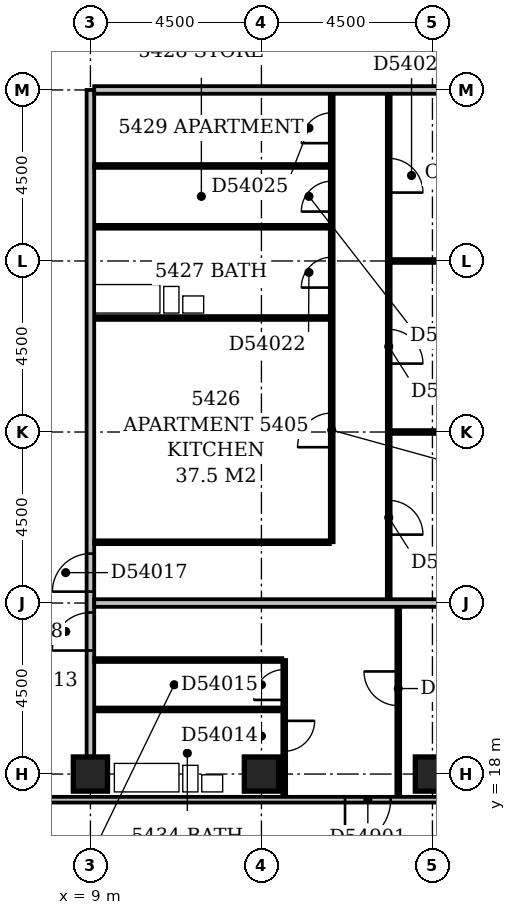
"""IFC4 building model, lengths in metres.
Left out: names, types, materials, properties, quantities, classifications, styles, units other than length and angle.
Written with IfcOpenShell. Run it as: python <this file> out.ifc"""

import sys

from ifc_helpers import new_model, si_unit, direction, frame, frame_2d, origin, origin_2d, place, context, subcontext, project, spatial, rectangle, extrude, element, fill, save


model = new_model("IFC4")
c1 = context("Model", 3, precision=1e-05, world=origin(), true_north=direction((0.0, 1.0)))
c2 = subcontext(c1, "Body", "Model", "MODEL_VIEW")
j1 = project(units=[si_unit("LENGTHUNIT", "METRE"), si_unit("PLANEANGLEUNIT", "RADIAN")], contexts=[c1])
p1 = place(None, origin())
s1 = spatial("IfcSite", under=j1, at=p1, CompositionType="ELEMENT")
p2 = place(p1, origin())
s2 = spatial("IfcBuilding", under=s1, at=p2, CompositionType="ELEMENT")
p3 = place(p2, frame((0.0, 0.0, 211.4)))
s3 = spatial("IfcBuildingStorey", under=s2, at=p3, CompositionType="ELEMENT", Elevation=211.4)
for number, where, z_axis, x_axis in (
    (1, (9.0, 18.0, -0.35), (0.0, 0.0, 1.0), (1.0, 0.0, 0.0)),
    (2, (13.5, 18.0, -0.35), (0.0, 0.0, 1.0), (1.0, 0.0, 0.0)),
    (3, (18.0, 18.0, -0.35), (0.0, 0.0, 1.0), (1.0, 0.0, 0.0)),
):
    element("IfcColumn", number, at=place(p3, frame(where, z_axis=z_axis, x_axis=x_axis)), inside=s3, PredefinedType="COLUMN", context=c2, shape_type="SweptSolid", body=[
        extrude(rectangle(XDim=0.9, YDim=0.9, at=origin_2d()), origin(), (0.0, 0.0, 1.0), 3.65),
    ])
p4 = place(p3, frame((3.9, 17.325, 0.0), z_axis=(0.0, 0.0, 1.0), x_axis=(1.0, 0.0, 0.0)))
e4 = element("IfcWall", 4, at=p4, inside=s3, PredefinedType="STANDARD", context=c2, shape_type="SweptSolid", body=[
    extrude(rectangle(XDim=19.35, YDim=0.15, at=frame_2d((9.675, 0.0))), origin(), (0.0, 0.0, 1.0), 2.7),
])
p5 = place(p4, frame((11.8, 0.0, 0.0)))
e5 = element("IfcOpeningElement", 5, at=p5, cuts=e4, PredefinedType="OPENING", context=c2, shape_type="SweptSolid", body=[
    extrude(rectangle(XDim=1.2, YDim=2.4, at=frame_2d((0.6, 1.2))), frame((0.0, 0.087, 0.0), z_axis=(0.0, -1.0, 0.0), x_axis=(1.0, 0.0, 0.0)), (0.0, 0.0, 1.0), 0.174),
])
p6 = place(p4, frame((15.15, 0.0, 0.6)))
e6 = element("IfcOpeningElement", 6, at=p6, cuts=e4, PredefinedType="OPENING", context=c2, shape_type="SweptSolid", body=[
    extrude(rectangle(XDim=2.4, YDim=1.8, at=frame_2d((1.2, 0.9))), frame((0.0, 0.087, 0.0), z_axis=(0.0, -1.0, 0.0), x_axis=(1.0, 0.0, 0.0)), (0.0, 0.0, 1.0), 0.174),
])
p7 = place(p3, frame((14.1, 17.4, 0.0), z_axis=(0.0, 0.0, 1.0), x_axis=(0.0, 1.0, 0.0)))
e7 = element("IfcWall", 7, at=p7, inside=s3, PredefinedType="PARTITIONING", context=c2, shape_type="SweptSolid", body=[
    extrude(rectangle(XDim=3.6, YDim=0.1, at=frame_2d((1.8, 0.0))), origin(), (0.0, 0.0, 1.0), 3.3),
])
p8 = place(p7, frame((1.2, 0.0, 0.0)))
e8 = element("IfcOpeningElement", 8, at=p8, cuts=e7, PredefinedType="OPENING", context=c2, shape_type="SweptSolid", body=[
    extrude(rectangle(XDim=0.8, YDim=2.1, at=frame_2d((0.4, 1.05))), frame((0.0, 0.062, 0.0), z_axis=(0.0, -1.0, 0.0), x_axis=(1.0, 0.0, 0.0)), (0.0, 0.0, 1.0), 0.124),
])
p9 = place(p7, frame((2.55, 0.0, 0.0)))
e9 = element("IfcOpeningElement", 9, at=p9, cuts=e7, PredefinedType="OPENING", context=c2, shape_type="SweptSolid", body=[
    extrude(rectangle(XDim=0.8, YDim=2.1, at=frame_2d((0.4, 1.05))), frame((0.0, 0.062, 0.0), z_axis=(0.0, -1.0, 0.0), x_axis=(1.0, 0.0, 0.0)), (0.0, 0.0, 1.0), 0.124),
])
p10 = place(p3, frame((17.1, 17.4, 0.0), z_axis=(0.0, 0.0, 1.0), x_axis=(0.0, 1.0, 0.0)))
e10 = element("IfcWall", 10, at=p10, inside=s3, PredefinedType="PARTITIONING", context=c2, shape_type="SweptSolid", body=[
    extrude(rectangle(XDim=5.0, YDim=0.1, at=frame_2d((2.5, 0.0))), origin(), (0.0, 0.0, 1.0), 3.3),
])
p11 = place(p10, frame((2.4, 0.0, 0.0)))
e11 = element("IfcOpeningElement", 11, at=p11, cuts=e10, PredefinedType="OPENING", context=c2, shape_type="SweptSolid", body=[
    extrude(rectangle(XDim=0.9, YDim=2.1, at=frame_2d((0.45, 1.05))), frame((0.0, 0.062, 0.0), z_axis=(0.0, -1.0, 0.0), x_axis=(1.0, 0.0, 0.0)), (0.0, 0.0, 1.0), 0.124),
])
p12 = place(p3, frame((9.0, 18.45, 0.0), z_axis=(0.0, 0.0, 1.0), x_axis=(0.0, 1.0, 0.0)))
e12 = element("IfcWall", 12, at=p12, inside=s3, PredefinedType="PARTITIONING", context=c2, shape_type="SweptSolid", body=[
    extrude(rectangle(XDim=17.55, YDim=0.2, at=frame_2d((8.775, 0.0))), origin(), (0.0, 0.0, 1.0), 3.3),
])
p13 = place(p12, frame((4.35, 0.0, 0.0)))
e13 = element("IfcOpeningElement", 13, at=p13, cuts=e12, PredefinedType="OPENING", context=c2, shape_type="SweptSolid", body=[
    extrude(rectangle(XDim=1.0, YDim=2.1, at=frame_2d((0.5, 1.05))), frame((0.0, 0.112, 0.0), z_axis=(0.0, -1.0, 0.0), x_axis=(1.0, 0.0, 0.0)), (0.0, 0.0, 1.0), 0.224),
])
p14 = place(p12, frame((2.8, 0.0, 0.0)))
e14 = element("IfcOpeningElement", 14, at=p14, cuts=e12, PredefinedType="OPENING", context=c2, shape_type="SweptSolid", body=[
    extrude(rectangle(XDim=1.0, YDim=2.1, at=frame_2d((0.5, 1.05))), frame((0.0, 0.112, 0.0), z_axis=(0.0, -1.0, 0.0), x_axis=(1.0, 0.0, 0.0)), (0.0, 0.0, 1.0), 0.224),
])
p15 = place(p3, frame((9.1, 19.7, 0.0), z_axis=(0.0, 0.0, 1.0), x_axis=(1.0, 0.0, 0.0)))
e15 = element("IfcWall", 15, at=p15, inside=s3, PredefinedType="PLUMBINGWALL", context=c2, shape_type="SweptSolid", body=[
    extrude(rectangle(XDim=4.95, YDim=0.1, at=frame_2d((2.475, 0.0))), origin(), (0.0, 0.0, 1.0), 3.3),
])
p16 = place(p3, frame((9.1, 21.0, 0.0), z_axis=(0.0, 0.0, 1.0), x_axis=(1.0, 0.0, 0.0)))
e16 = element("IfcWall", 16, at=p16, inside=s3, PredefinedType="PARTITIONING", context=c2, shape_type="SweptSolid", body=[
    extrude(rectangle(XDim=4.95, YDim=0.1, at=frame_2d((2.475, 0.0))), origin(), (0.0, 0.0, 1.0), 3.3),
])
p17 = place(p3, frame((9.1, 22.5, 0.0), z_axis=(0.0, 0.0, 1.0), x_axis=(1.0, 0.0, 0.0)))
e17 = element("IfcWall", 17, at=p17, inside=s3, PredefinedType="PARTITIONING", context=c2, shape_type="SweptSolid", body=[
    extrude(rectangle(XDim=12.95, YDim=0.2, at=frame_2d((6.475, 0.0))), origin(), (0.0, 0.0, 1.0), 3.3),
])
p18 = place(p3, frame((16.85, 22.6, 0.0), z_axis=(0.0, 0.0, 1.0), x_axis=(0.0, 1.0, 0.0)))
e18 = element("IfcWall", 18, at=p18, inside=s3, PredefinedType="PARTITIONING", context=c2, shape_type="SweptSolid", body=[
    extrude(rectangle(XDim=13.3, YDim=0.1, at=frame_2d((6.65, 0.0))), origin(), (0.0, 0.0, 1.0), 3.3),
])
p19 = place(p18, frame((1.7, 0.0, 0.0)))
e19 = element("IfcOpeningElement", 19, at=p19, cuts=e18, PredefinedType="OPENING", context=c2, shape_type="SweptSolid", body=[
    extrude(rectangle(XDim=0.9, YDim=2.1, at=frame_2d((0.45, 1.05))), frame((0.0, 0.062, 0.0), z_axis=(0.0, -1.0, 0.0), x_axis=(1.0, 0.0, 0.0)), (0.0, 0.0, 1.0), 0.124),
])
p20 = place(p18, frame((6.2, 0.0, 0.0)))
e20 = element("IfcOpeningElement", 20, at=p20, cuts=e18, PredefinedType="OPENING", context=c2, shape_type="SweptSolid", body=[
    extrude(rectangle(XDim=0.9, YDim=2.1, at=frame_2d((0.45, 1.05))), frame((0.0, 0.062, 0.0), z_axis=(0.0, -1.0, 0.0), x_axis=(1.0, 0.0, 0.0)), (0.0, 0.0, 1.0), 0.124),
])
p21 = place(p18, frame((10.7, 0.0, 0.0)))
e21 = element("IfcOpeningElement", 21, at=p21, cuts=e18, PredefinedType="OPENING", context=c2, shape_type="SweptSolid", body=[
    extrude(rectangle(XDim=0.9, YDim=2.1, at=frame_2d((0.45, 1.05))), frame((0.0, 0.062, 0.0), z_axis=(0.0, -1.0, 0.0), x_axis=(1.0, 0.0, 0.0)), (0.0, 0.0, 1.0), 0.124),
])
p22 = place(p3, frame((9.1, 24.1, 0.0), z_axis=(0.0, 0.0, 1.0), x_axis=(1.0, 0.0, 0.0)))
e22 = element("IfcWall", 22, at=p22, inside=s3, PredefinedType="PARTITIONING", context=c2, shape_type="SweptSolid", body=[
    extrude(rectangle(XDim=6.2, YDim=0.1, at=frame_2d((3.1, 0.0))), origin(), (0.0, 0.0, 1.0), 3.3),
])
p23 = place(p3, frame((15.35, 24.1, 0.0), z_axis=(0.0, 0.0, 1.0), x_axis=(0.0, 1.0, 0.0)))
e23 = element("IfcWall", 23, at=p23, inside=s3, PredefinedType="PARTITIONING", context=c2, shape_type="SweptSolid", body=[
    extrude(rectangle(XDim=11.8, YDim=0.1, at=frame_2d((5.9, 0.0))), origin(), (0.0, 0.0, 1.0), 3.3),
])
p24 = place(p23, frame((6.7, 0.0, 0.0)))
e24 = element("IfcOpeningElement", 24, at=p24, cuts=e23, PredefinedType="OPENING", context=c2, shape_type="SweptSolid", body=[
    extrude(rectangle(XDim=0.8, YDim=2.1, at=frame_2d((0.4, 1.05))), frame((0.0, 0.062, 0.0), z_axis=(0.0, -1.0, 0.0), x_axis=(1.0, 0.0, 0.0)), (0.0, 0.0, 1.0), 0.124),
])
p25 = place(p23, frame((2.5, 0.0, 0.0)))
e25 = element("IfcOpeningElement", 25, at=p25, cuts=e23, PredefinedType="OPENING", context=c2, shape_type="SweptSolid", body=[
    extrude(rectangle(XDim=0.9, YDim=2.1, at=frame_2d((0.45, 1.05))), frame((0.0, 0.062, 0.0), z_axis=(0.0, -1.0, 0.0), x_axis=(1.0, 0.0, 0.0)), (0.0, 0.0, 1.0), 0.124),
])
p26 = place(p23, frame((8.7, 0.0, 0.0)))
e26 = element("IfcOpeningElement", 26, at=p26, cuts=e23, PredefinedType="OPENING", context=c2, shape_type="SweptSolid", body=[
    extrude(rectangle(XDim=0.8, YDim=2.1, at=frame_2d((0.4, 1.05))), frame((0.0, 0.062, 0.0), z_axis=(0.0, -1.0, 0.0), x_axis=(1.0, 0.0, 0.0)), (0.0, 0.0, 1.0), 0.124),
])
p27 = place(p23, frame((10.5, 0.0, 0.0)))
e27 = element("IfcOpeningElement", 27, at=p27, cuts=e23, PredefinedType="OPENING", context=c2, shape_type="SweptSolid", body=[
    extrude(rectangle(XDim=0.8, YDim=2.1, at=frame_2d((0.4, 1.05))), frame((0.0, 0.062, 0.0), z_axis=(0.0, -1.0, 0.0), x_axis=(1.0, 0.0, 0.0)), (0.0, 0.0, 1.0), 0.124),
])
p28 = place(p3, frame((16.9, 27.0, 0.0), z_axis=(0.0, 0.0, 1.0), x_axis=(1.0, 0.0, 0.0)))
e28 = element("IfcWall", 28, at=p28, inside=s3, PredefinedType="PARTITIONING", context=c2, shape_type="SweptSolid", body=[
    extrude(rectangle(XDim=5.15, YDim=0.1, at=frame_2d((2.575, 0.0))), origin(), (0.0, 0.0, 1.0), 2.7),
])
p29 = place(p3, frame((9.1, 30.0, 0.0), z_axis=(0.0, 0.0, 1.0), x_axis=(1.0, 0.0, 0.0)))
e29 = element("IfcWall", 29, at=p29, inside=s3, PredefinedType="PLUMBINGWALL", context=c2, shape_type="SweptSolid", body=[
    extrude(rectangle(XDim=6.2, YDim=0.1, at=frame_2d((3.1, 0.0))), origin(), (0.0, 0.0, 1.0), 3.3),
])
p30 = place(p3, frame((16.9, 31.5, 0.0), z_axis=(0.0, 0.0, 1.0), x_axis=(1.0, 0.0, 0.0)))
e30 = element("IfcWall", 30, at=p30, inside=s3, PredefinedType="PARTITIONING", context=c2, shape_type="SweptSolid", body=[
    extrude(rectangle(XDim=5.15, YDim=0.1, at=frame_2d((2.575, 0.0))), origin(), (0.0, 0.0, 1.0), 3.3),
])
p31 = place(p3, frame((9.1, 32.4, 0.0), z_axis=(0.0, 0.0, 1.0), x_axis=(1.0, 0.0, 0.0)))
e31 = element("IfcWall", 31, at=p31, inside=s3, PredefinedType="PLUMBINGWALL", context=c2, shape_type="SweptSolid", body=[
    extrude(rectangle(XDim=6.2, YDim=0.1, at=frame_2d((3.1, 0.0))), origin(), (0.0, 0.0, 1.0), 3.3),
])
p32 = place(p3, frame((9.1, 34.0, 0.0), z_axis=(0.0, 0.0, 1.0), x_axis=(1.0, 0.0, 0.0)))
e32 = element("IfcWall", 32, at=p32, inside=s3, PredefinedType="PARTITIONING", context=c2, shape_type="SweptSolid", body=[
    extrude(rectangle(XDim=6.2, YDim=0.1, at=frame_2d((3.1, 0.0))), origin(), (0.0, 0.0, 1.0), 3.3),
])
p33 = place(p3, frame((9.1, 36.0, 0.0), z_axis=(0.0, 0.0, 1.0), x_axis=(1.0, 0.0, 0.0)))
e33 = element("IfcWall", 33, at=p33, inside=s3, PredefinedType="PARTITIONING", context=c2, shape_type="SweptSolid", body=[
    extrude(rectangle(XDim=12.95, YDim=0.2, at=frame_2d((6.475, 0.0))), origin(), (0.0, 0.0, 1.0), 3.3),
])
p34 = place(p5, origin())
e34 = element("IfcDoor", 34, at=p34, inside=s3, OperationType="DOUBLE_DOOR_SINGLE_SWING", PredefinedType="DOOR", context=c2, shape_type="SweptSolid", body=[
    extrude(rectangle(XDim=1.2, YDim=2.4, at=frame_2d((0.6, 1.2))), frame((0.0, 0.025, 0.0), z_axis=(0.0, -1.0, 0.0), x_axis=(1.0, 0.0, 0.0)), (0.0, 0.0, 1.0), 0.05),
])
fill(e5, e34)
p35 = place(p8, origin())
e35 = element("IfcDoor", 35, at=p35, inside=s3, OperationType="SINGLE_SWING_RIGHT", PredefinedType="DOOR", context=c2, shape_type="SweptSolid", body=[
    extrude(rectangle(XDim=0.8, YDim=2.1, at=frame_2d((0.4, 1.05))), frame((0.0, 0.025, 0.0), z_axis=(0.0, -1.0, 0.0), x_axis=(1.0, 0.0, 0.0)), (0.0, 0.0, 1.0), 0.05),
])
fill(e8, e35)
p36 = place(p9, origin())
e36 = element("IfcDoor", 36, at=p36, inside=s3, OperationType="SINGLE_SWING_LEFT", PredefinedType="DOOR", context=c2, shape_type="SweptSolid", body=[
    extrude(rectangle(XDim=0.8, YDim=2.1, at=frame_2d((0.4, 1.05))), frame((0.0, 0.025, 0.0), z_axis=(0.0, -1.0, 0.0), x_axis=(1.0, 0.0, 0.0)), (0.0, 0.0, 1.0), 0.05),
])
fill(e9, e36)
p37 = place(p11, frame((0.9, 0.0, 0.0), z_axis=(0.0, 0.0, 1.0), x_axis=(-1.0, 0.0, 0.0)))
e37 = element("IfcDoor", 37, at=p37, inside=s3, OperationType="SINGLE_SWING_LEFT", PredefinedType="DOOR", context=c2, shape_type="SweptSolid", body=[
    extrude(rectangle(XDim=0.9, YDim=2.1, at=frame_2d((0.45, 1.05))), frame((0.0, 0.025, 0.0), z_axis=(0.0, -1.0, 0.0), x_axis=(1.0, 0.0, 0.0)), (0.0, 0.0, 1.0), 0.05),
])
fill(e11, e37)
p38 = place(p13, origin())
e38 = element("IfcDoor", 38, at=p38, inside=s3, OperationType="SINGLE_SWING_LEFT", PredefinedType="DOOR", context=c2, shape_type="SweptSolid", body=[
    extrude(rectangle(XDim=1.0, YDim=2.1, at=frame_2d((0.5, 1.05))), frame((0.0, 0.025, 0.0), z_axis=(0.0, -1.0, 0.0), x_axis=(1.0, 0.0, 0.0)), (0.0, 0.0, 1.0), 0.05),
])
fill(e13, e38)
p39 = place(p14, origin())
e39 = element("IfcDoor", 39, at=p39, inside=s3, OperationType="SINGLE_SWING_LEFT", PredefinedType="DOOR", context=c2, shape_type="SweptSolid", body=[
    extrude(rectangle(XDim=1.0, YDim=2.1, at=frame_2d((0.5, 1.05))), frame((0.0, 0.025, 0.0), z_axis=(0.0, -1.0, 0.0), x_axis=(1.0, 0.0, 0.0)), (0.0, 0.0, 1.0), 0.05),
])
fill(e14, e39)
p40 = place(p19, frame((0.9, 0.0, 0.0), z_axis=(0.0, 0.0, 1.0), x_axis=(-1.0, 0.0, 0.0)))
e40 = element("IfcDoor", 40, at=p40, inside=s3, OperationType="SINGLE_SWING_RIGHT", PredefinedType="DOOR", context=c2, shape_type="SweptSolid", body=[
    extrude(rectangle(XDim=0.9, YDim=2.1, at=frame_2d((0.45, 1.05))), frame((0.0, 0.025, 0.0), z_axis=(0.0, -1.0, 0.0), x_axis=(1.0, 0.0, 0.0)), (0.0, 0.0, 1.0), 0.05),
])
fill(e19, e40)
p41 = place(p20, frame((0.9, 0.0, 0.0), z_axis=(0.0, 0.0, 1.0), x_axis=(-1.0, 0.0, 0.0)))
e41 = element("IfcDoor", 41, at=p41, inside=s3, OperationType="SINGLE_SWING_RIGHT", PredefinedType="DOOR", context=c2, shape_type="SweptSolid", body=[
    extrude(rectangle(XDim=0.9, YDim=2.1, at=frame_2d((0.45, 1.05))), frame((0.0, 0.025, 0.0), z_axis=(0.0, -1.0, 0.0), x_axis=(1.0, 0.0, 0.0)), (0.0, 0.0, 1.0), 0.05),
])
fill(e20, e41)
p42 = place(p21, frame((0.9, 0.0, 0.0), z_axis=(0.0, 0.0, 1.0), x_axis=(-1.0, 0.0, 0.0)))
e42 = element("IfcDoor", 42, at=p42, inside=s3, OperationType="SINGLE_SWING_RIGHT", PredefinedType="DOOR", context=c2, shape_type="SweptSolid", body=[
    extrude(rectangle(XDim=0.9, YDim=2.1, at=frame_2d((0.45, 1.05))), frame((0.0, 0.025, 0.0), z_axis=(0.0, -1.0, 0.0), x_axis=(1.0, 0.0, 0.0)), (0.0, 0.0, 1.0), 0.05),
])
fill(e21, e42)
p43 = place(p24, origin())
e43 = element("IfcDoor", 43, at=p43, inside=s3, OperationType="SINGLE_SWING_LEFT", PredefinedType="DOOR", context=c2, shape_type="SweptSolid", body=[
    extrude(rectangle(XDim=0.8, YDim=2.1, at=frame_2d((0.4, 1.05))), frame((0.0, 0.025, 0.0), z_axis=(0.0, -1.0, 0.0), x_axis=(1.0, 0.0, 0.0)), (0.0, 0.0, 1.0), 0.05),
])
fill(e24, e43)
p44 = place(p25, origin())
e44 = element("IfcDoor", 44, at=p44, inside=s3, OperationType="SINGLE_SWING_LEFT", PredefinedType="DOOR", context=c2, shape_type="SweptSolid", body=[
    extrude(rectangle(XDim=0.9, YDim=2.1, at=frame_2d((0.45, 1.05))), frame((0.0, 0.025, 0.0), z_axis=(0.0, -1.0, 0.0), x_axis=(1.0, 0.0, 0.0)), (0.0, 0.0, 1.0), 0.05),
])
fill(e25, e44)
p45 = place(p26, origin())
e45 = element("IfcDoor", 45, at=p45, inside=s3, OperationType="SINGLE_SWING_LEFT", PredefinedType="DOOR", context=c2, shape_type="SweptSolid", body=[
    extrude(rectangle(XDim=0.8, YDim=2.1, at=frame_2d((0.4, 1.05))), frame((0.0, 0.025, 0.0), z_axis=(0.0, -1.0, 0.0), x_axis=(1.0, 0.0, 0.0)), (0.0, 0.0, 1.0), 0.05),
])
fill(e26, e45)
p46 = place(p27, origin())
e46 = element("IfcDoor", 46, at=p46, inside=s3, OperationType="SINGLE_SWING_LEFT", PredefinedType="DOOR", context=c2, shape_type="SweptSolid", body=[
    extrude(rectangle(XDim=0.8, YDim=2.1, at=frame_2d((0.4, 1.05))), frame((0.0, 0.025, 0.0), z_axis=(0.0, -1.0, 0.0), x_axis=(1.0, 0.0, 0.0)), (0.0, 0.0, 1.0), 0.05),
])
fill(e27, e46)
save(model, sys.argv[1])
